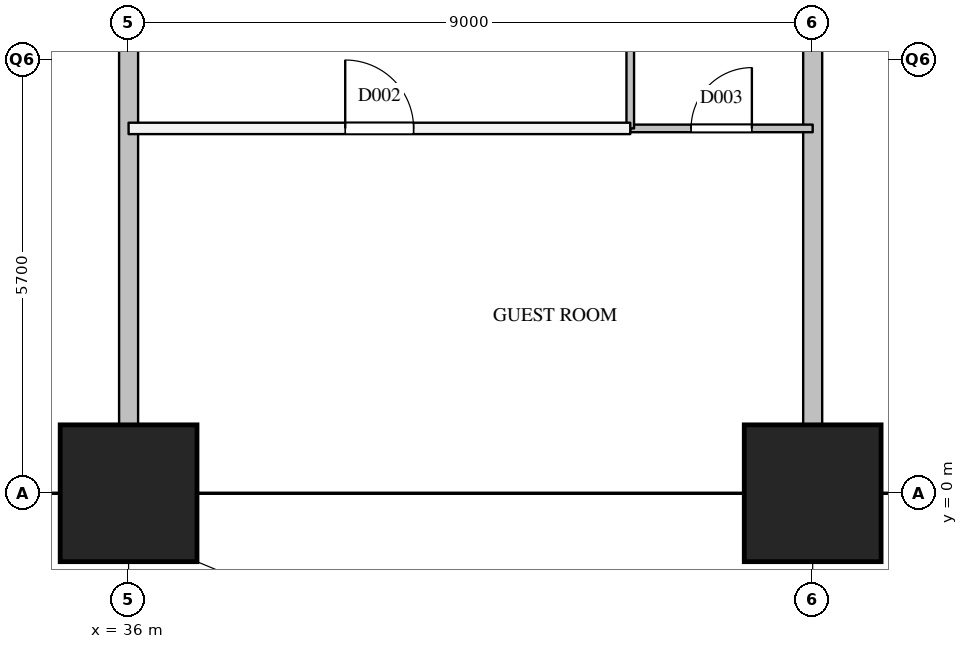
"""IFC4 building model, lengths in metres.
Left out: names, types, materials, properties, quantities, classifications, styles, units other than length and angle.
Written with IfcOpenShell. Run it as: python <this file> out.ifc"""

import sys

from ifc_helpers import new_model, si_unit, direction, frame, frame_2d, origin, origin_2d, place, context, subcontext, project, spatial, rectangle, extrude, element, fill, save


model = new_model("IFC4")
c1 = context("Model", 3, precision=1e-05, world=origin(), true_north=direction((0.0, 1.0)))
c2 = subcontext(c1, "Body", "Model", "MODEL_VIEW")
j1 = project(units=[si_unit("LENGTHUNIT", "METRE"), si_unit("PLANEANGLEUNIT", "RADIAN")], contexts=[c1])
p1 = place(None, origin())
s1 = spatial("IfcSite", under=j1, at=p1, CompositionType="ELEMENT")
p2 = place(p1, origin())
s2 = spatial("IfcBuilding", under=s1, at=p2, CompositionType="ELEMENT")
p3 = place(p2, frame((0.0, 0.0, 104.4)))
s3 = spatial("IfcBuildingStorey", under=s2, at=p3, CompositionType="ELEMENT", Elevation=104.4)
for number, where, z_axis, x_axis in (
    (1, (36.0, 0.0, 0.0), (0.0, 0.0, 1.0), (1.0, 0.0, 0.0)),
    (2, (45.0, 0.0, 0.0), (0.0, 0.0, 1.0), (1.0, 0.0, 0.0)),
):
    element("IfcColumn", number, at=place(p3, frame(where, z_axis=z_axis, x_axis=x_axis)), inside=s3, PredefinedType="COLUMN", context=c2, shape_type="SweptSolid", body=[
        extrude(rectangle(XDim=1.8, YDim=1.8, at=origin_2d()), origin(), (0.0, 0.0, 1.0), 3.8),
    ])
p4 = place(p3, frame((36.0, 4.8, 0.0), z_axis=(0.0, 0.0, 1.0), x_axis=(1.0, 0.0, 0.0)))
e3 = element("IfcWall", 3, at=p4, inside=s3, PredefinedType="PARTITIONING", context=c2, shape_type="SweptSolid", body=[
    extrude(rectangle(XDim=6.6, YDim=0.15, at=frame_2d((3.3, 0.0))), origin(), (0.0, 0.0, 1.0), 3.5),
])
p5 = place(p4, frame((2.85, 0.0, 0.0)))
e4 = element("IfcOpeningElement", 4, at=p5, cuts=e3, PredefinedType="OPENING", context=c2, shape_type="SweptSolid", body=[
    extrude(rectangle(XDim=0.9, YDim=2.1, at=frame_2d((0.45, 1.05))), frame((0.0, 0.085, 0.0), z_axis=(0.0, -1.0, 0.0), x_axis=(1.0, 0.0, 0.0)), (0.0, 0.0, 1.0), 0.17),
])
for number, where, z_axis, x_axis in (
    (5, (36.0, 0.0, 0.0), (0.0, 0.0, 1.0), (0.0, 1.0, 0.0)),
    (6, (45.0, 0.0, 0.0), (0.0, 0.0, 1.0), (0.0, 1.0, 0.0)),
):
    element("IfcWall", number, at=place(p3, frame(where, z_axis=z_axis, x_axis=x_axis)), inside=s3, PredefinedType="PARTITIONING", context=c2, shape_type="SweptSolid", body=[
        extrude(rectangle(XDim=7.2, YDim=0.25, at=frame_2d((3.6, 0.0))), origin(), (0.0, 0.0, 1.0), 3.5),
    ])
p6 = place(p3, frame((42.6, 4.8, 0.0), z_axis=(0.0, 0.0, 1.0), x_axis=(1.0, 0.0, 0.0)))
e7 = element("IfcWall", 7, at=p6, inside=s3, PredefinedType="PARTITIONING", context=c2, shape_type="SweptSolid", body=[
    extrude(rectangle(XDim=2.4, YDim=0.1, at=frame_2d((1.2, 0.0))), origin(), (0.0, 0.0, 1.0), 3.5),
])
p7 = place(p6, frame((0.8, 0.0, 0.0)))
e8 = element("IfcOpeningElement", 8, at=p7, cuts=e7, PredefinedType="OPENING", context=c2, shape_type="SweptSolid", body=[
    extrude(rectangle(XDim=0.8, YDim=2.1, at=frame_2d((0.4, 1.05))), frame((0.0, 0.06, 0.0), z_axis=(0.0, -1.0, 0.0), x_axis=(1.0, 0.0, 0.0)), (0.0, 0.0, 1.0), 0.12),
])
p8 = place(p3, frame((42.6, 4.8, 0.0), z_axis=(0.0, 0.0, 1.0), x_axis=(0.0, 1.0, 0.0)))
e9 = element("IfcWall", 9, at=p8, inside=s3, PredefinedType="PARTITIONING", context=c2, shape_type="SweptSolid", body=[
    extrude(rectangle(XDim=2.4, YDim=0.1, at=frame_2d((1.2, 0.0))), origin(), (0.0, 0.0, 1.0), 3.5),
])
p9 = place(p5, origin())
e10 = element("IfcDoor", 10, at=p9, inside=s3, OperationType="SINGLE_SWING_LEFT", PredefinedType="DOOR", context=c2, shape_type="SweptSolid", body=[
    extrude(rectangle(XDim=0.9, YDim=2.1, at=frame_2d((0.45, 1.05))), frame((0.0, 0.025, 0.0), z_axis=(0.0, -1.0, 0.0), x_axis=(1.0, 0.0, 0.0)), (0.0, 0.0, 1.0), 0.05),
])
fill(e4, e10)
p10 = place(p7, origin())
e11 = element("IfcDoor", 11, at=p10, inside=s3, OperationType="SINGLE_SWING_RIGHT", PredefinedType="DOOR", context=c2, shape_type="SweptSolid", body=[
    extrude(rectangle(XDim=0.8, YDim=2.1, at=frame_2d((0.4, 1.05))), frame((0.0, 0.025, 0.0), z_axis=(0.0, -1.0, 0.0), x_axis=(1.0, 0.0, 0.0)), (0.0, 0.0, 1.0), 0.05),
])
fill(e8, e11)
save(model, sys.argv[1])
